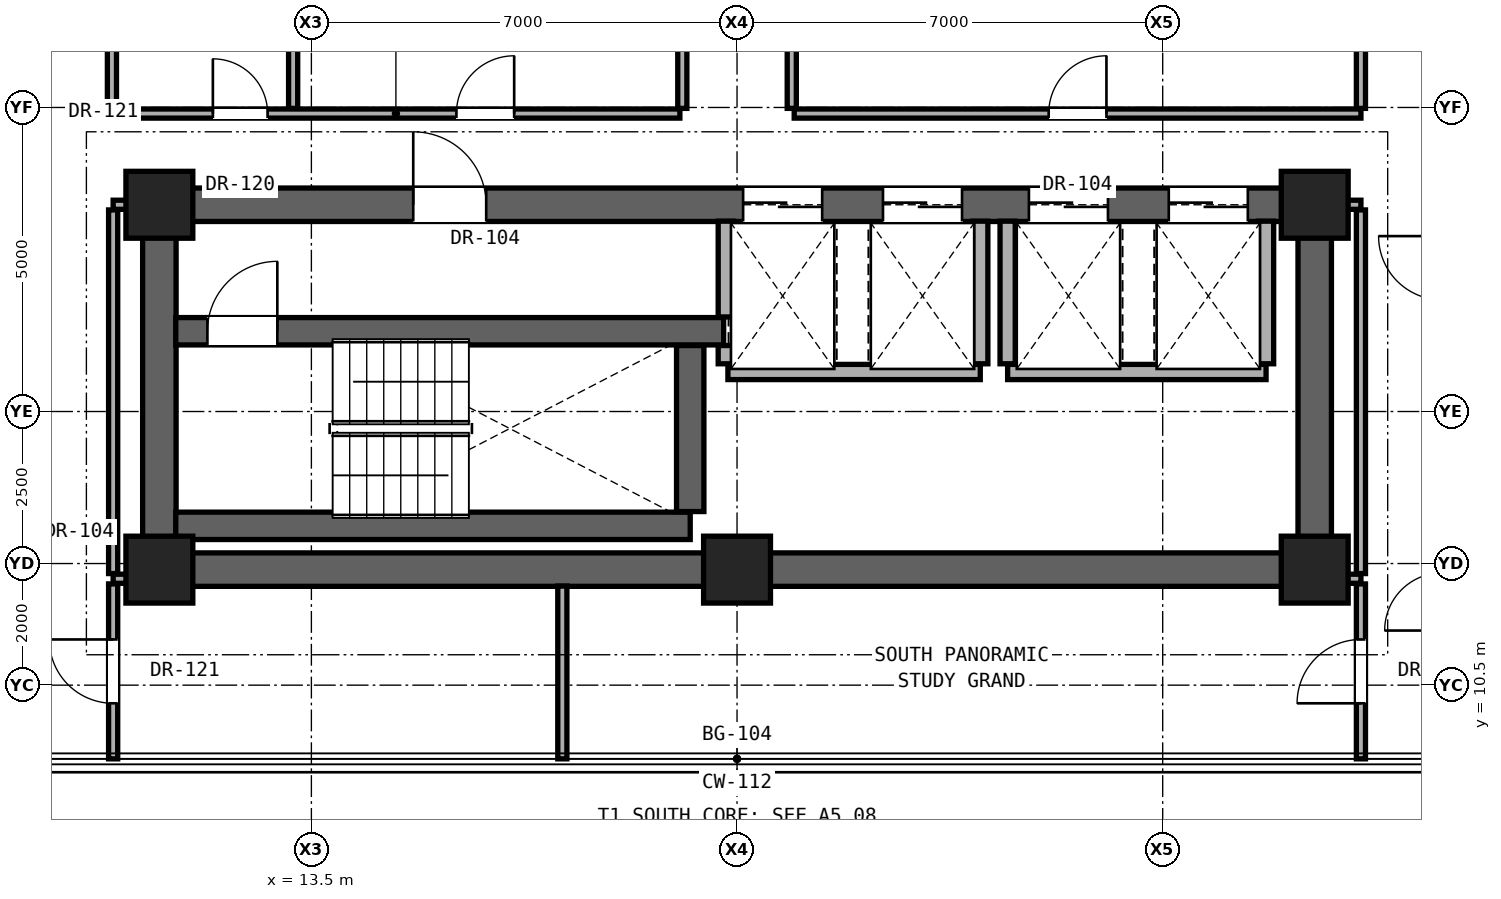
"""IFC4 building model, lengths in metres.
Left out: names, types, materials, properties, quantities, classifications, styles, units other than length and angle.
Written with IfcOpenShell. Run it as: python <this file> out.ifc"""

import sys

from ifc_helpers import new_model, si_unit, direction, frame, frame_2d, origin, origin_2d, place, context, subcontext, project, spatial, rectangle, extrude, element, fill, save


model = new_model("IFC4")
c1 = context("Model", 3, precision=1e-05, world=origin(), true_north=direction((0.0, 1.0)))
c2 = subcontext(c1, "Body", "Model", "MODEL_VIEW")
j1 = project(units=[si_unit("LENGTHUNIT", "METRE"), si_unit("PLANEANGLEUNIT", "RADIAN")], contexts=[c1])
p1 = place(None, origin())
s1 = spatial("IfcSite", under=j1, at=p1, CompositionType="ELEMENT")
p2 = place(p1, origin())
s2 = spatial("IfcBuilding", under=s1, at=p2, CompositionType="ELEMENT")
p3 = place(p2, frame((0.0, 0.0, 131.3)))
s3 = spatial("IfcBuildingStorey", under=s2, at=p3, CompositionType="ELEMENT", Elevation=131.3)
for number, where, z_axis, x_axis in (
    (1, (11.0, 12.4, 0.0), (0.0, 0.0, 1.0), (1.0, 0.0, 0.0)),
    (2, (20.5, 12.4, 0.0), (0.0, 0.0, 1.0), (1.0, 0.0, 0.0)),
    (3, (30.0, 12.4, 0.0), (0.0, 0.0, 1.0), (1.0, 0.0, 0.0)),
    (4, (11.0, 18.4, 0.0), (0.0, 0.0, 1.0), (1.0, 0.0, 0.0)),
    (5, (30.0, 18.4, 0.0), (0.0, 0.0, 1.0), (1.0, 0.0, 0.0)),
):
    element("IfcColumn", number, at=place(p3, frame(where, z_axis=z_axis, x_axis=x_axis)), inside=s3, PredefinedType="COLUMN", context=c2, shape_type="SweptSolid", body=[
        extrude(rectangle(XDim=1.1, YDim=1.1, at=origin_2d()), origin(), (0.0, 0.0, 1.0), 3.3),
    ])
p4 = place(p3, frame((11.0, 12.4, 0.0), z_axis=(0.0, 0.0, 1.0), x_axis=(1.0, 0.0, 0.0)))
e6 = element("IfcWall", 6, at=p4, inside=s3, PredefinedType="SHEAR", context=c2, shape_type="SweptSolid", body=[
    extrude(rectangle(XDim=19.0, YDim=0.55, at=frame_2d((9.5, 0.0))), origin(), (0.0, 0.0, 1.0), 3.08),
])
for number, where, z_axis, x_axis in (
    (7, (11.0, 12.4, 0.0), (0.0, 0.0, 1.0), (0.0, 1.0, 0.0)),
    (8, (30.0, 12.4, 0.0), (0.0, 0.0, 1.0), (0.0, 1.0, 0.0)),
):
    element("IfcWall", number, at=place(p3, frame(where, z_axis=z_axis, x_axis=x_axis)), inside=s3, PredefinedType="SHEAR", context=c2, shape_type="SweptSolid", body=[
        extrude(rectangle(XDim=6.0, YDim=0.55, at=frame_2d((3.0, 0.0))), origin(), (0.0, 0.0, 1.0), 3.08),
    ])
p5 = place(p3, frame((11.0, 18.4, 0.0), z_axis=(0.0, 0.0, 1.0), x_axis=(1.0, 0.0, 0.0)))
e9 = element("IfcWall", 9, at=p5, inside=s3, PredefinedType="SHEAR", context=c2, shape_type="SweptSolid", body=[
    extrude(rectangle(XDim=19.0, YDim=0.55, at=frame_2d((9.5, 0.0))), origin(), (0.0, 0.0, 1.0), 3.08),
])
p6 = place(p5, frame((4.175, 0.0, 0.0)))
e10 = element("IfcOpeningElement", 10, at=p6, cuts=e9, PredefinedType="OPENING", context=c2, shape_type="SweptSolid", body=[
    extrude(rectangle(XDim=1.2, YDim=2.25, at=frame_2d((0.6, 1.125))), frame((0.0, 0.285, 0.0), z_axis=(0.0, -1.0, 0.0), x_axis=(1.0, 0.0, 0.0)), (0.0, 0.0, 1.0), 0.57),
])
p7 = place(p5, frame((9.6, 0.0, 0.0)))
e11 = element("IfcOpeningElement", 11, at=p7, cuts=e9, PredefinedType="OPENING", context=c2, shape_type="SweptSolid", body=[
    extrude(rectangle(XDim=1.3, YDim=2.3, at=frame_2d((0.65, 1.15))), frame((0.0, 0.285, 0.0), z_axis=(0.0, -1.0, 0.0), x_axis=(1.0, 0.0, 0.0)), (0.0, 0.0, 1.0), 0.57),
])
p8 = place(p5, frame((11.9, 0.0, 0.0)))
e12 = element("IfcOpeningElement", 12, at=p8, cuts=e9, PredefinedType="OPENING", context=c2, shape_type="SweptSolid", body=[
    extrude(rectangle(XDim=1.3, YDim=2.3, at=frame_2d((0.65, 1.15))), frame((0.0, 0.285, 0.0), z_axis=(0.0, -1.0, 0.0), x_axis=(1.0, 0.0, 0.0)), (0.0, 0.0, 1.0), 0.57),
])
p9 = place(p5, frame((14.3, 0.0, 0.0)))
e13 = element("IfcOpeningElement", 13, at=p9, cuts=e9, PredefinedType="OPENING", context=c2, shape_type="SweptSolid", body=[
    extrude(rectangle(XDim=1.3, YDim=2.3, at=frame_2d((0.65, 1.15))), frame((0.0, 0.285, 0.0), z_axis=(0.0, -1.0, 0.0), x_axis=(1.0, 0.0, 0.0)), (0.0, 0.0, 1.0), 0.57),
])
p10 = place(p5, frame((16.6, 0.0, 0.0)))
e14 = element("IfcOpeningElement", 14, at=p10, cuts=e9, PredefinedType="OPENING", context=c2, shape_type="SweptSolid", body=[
    extrude(rectangle(XDim=1.3, YDim=2.3, at=frame_2d((0.65, 1.15))), frame((0.0, 0.285, 0.0), z_axis=(0.0, -1.0, 0.0), x_axis=(1.0, 0.0, 0.0)), (0.0, 0.0, 1.0), 0.57),
])
for number, where, z_axis, x_axis in (
    (15, (10.24, 12.25, 0.0), (0.0, 0.0, 1.0), (1.0, 0.0, 0.0)),
    (16, (30.27, 12.25, 0.0), (0.0, 0.0, 1.0), (1.0, 0.0, 0.0)),
):
    element("IfcWall", number, at=place(p3, frame(where, z_axis=z_axis, x_axis=x_axis)), inside=s3, PredefinedType="PARTITIONING", context=c2, shape_type="SweptSolid", body=[
        extrude(rectangle(XDim=0.49, YDim=0.15, at=frame_2d((0.245, 0.0))), origin(), (0.0, 0.0, 1.0), 3.08),
    ])
p11 = place(p3, frame((11.27, 13.12, 0.0), z_axis=(0.0, 0.0, 1.0), x_axis=(1.0, 0.0, 0.0)))
e17 = element("IfcWall", 17, at=p11, inside=s3, PredefinedType="SHEAR", context=c2, shape_type="SweptSolid", body=[
    extrude(rectangle(XDim=8.46, YDim=0.45, at=frame_2d((4.23, 0.0))), origin(), (0.0, 0.0, 1.0), 3.08),
])
p12 = place(p3, frame((20.35, 15.65, 0.0), z_axis=(0.0, 0.0, 1.0), x_axis=(1.0, 0.0, 0.0)))
e18 = element("IfcWall", 18, at=p12, inside=s3, PredefinedType="SOLIDWALL", context=c2, shape_type="SweptSolid", body=[
    extrude(rectangle(XDim=4.15, YDim=0.25, at=frame_2d((2.075, 0.0))), origin(), (0.0, 0.0, 1.0), 3.08),
])
p13 = place(p3, frame((24.95, 15.65, 0.0), z_axis=(0.0, 0.0, 1.0), x_axis=(1.0, 0.0, 0.0)))
e19 = element("IfcWall", 19, at=p13, inside=s3, PredefinedType="SOLIDWALL", context=c2, shape_type="SweptSolid", body=[
    extrude(rectangle(XDim=4.25, YDim=0.25, at=frame_2d((2.125, 0.0))), origin(), (0.0, 0.0, 1.0), 3.08),
])
p14 = place(p3, frame((11.27, 16.32, 0.0), z_axis=(0.0, 0.0, 1.0), x_axis=(1.0, 0.0, 0.0)))
e20 = element("IfcWall", 20, at=p14, inside=s3, PredefinedType="SHEAR", context=c2, shape_type="SweptSolid", body=[
    extrude(rectangle(XDim=9.01, YDim=0.45, at=frame_2d((4.505, 0.0))), origin(), (0.0, 0.0, 1.0), 3.08),
])
p15 = place(p14, frame((0.52, 0.0, 0.0)))
e21 = element("IfcOpeningElement", 21, at=p15, cuts=e20, PredefinedType="OPENING", context=c2, shape_type="SweptSolid", body=[
    extrude(rectangle(XDim=1.15, YDim=2.2, at=frame_2d((0.575, 1.1))), frame((0.0, 0.235, 0.0), z_axis=(0.0, -1.0, 0.0), x_axis=(1.0, 0.0, 0.0)), (0.0, 0.0, 1.0), 0.47),
])
for number, where, z_axis, x_axis in (
    (22, (10.24, 18.4, 0.0), (0.0, 0.0, 1.0), (1.0, 0.0, 0.0)),
    (23, (30.27, 18.4, 0.0), (0.0, 0.0, 1.0), (1.0, 0.0, 0.0)),
):
    element("IfcWall", number, at=place(p3, frame(where, z_axis=z_axis, x_axis=x_axis)), inside=s3, PredefinedType="PARTITIONING", context=c2, shape_type="SweptSolid", body=[
        extrude(rectangle(XDim=0.49, YDim=0.15, at=frame_2d((0.245, 0.0))), origin(), (0.0, 0.0, 1.0), 2.456),
    ])
p16 = place(p3, frame((10.22, 19.9, 0.0), z_axis=(0.0, 0.0, 1.0), x_axis=(1.0, 0.0, 0.0)))
e24 = element("IfcWall", 24, at=p16, inside=s3, PredefinedType="PARTITIONING", context=c2, shape_type="SweptSolid", body=[
    extrude(rectangle(XDim=9.34, YDim=0.15, at=frame_2d((4.67, 0.0))), origin(), (0.0, 0.0, 1.0), 2.216),
])
p17 = place(p16, frame((1.66, 0.0, 0.0)))
e25 = element("IfcOpeningElement", 25, at=p17, cuts=e24, PredefinedType="OPENING", context=c2, shape_type="SweptSolid", body=[
    extrude(rectangle(XDim=0.9, YDim=2.1, at=frame_2d((0.45, 1.05))), frame((0.0, 0.085, 0.0), z_axis=(0.0, -1.0, 0.0), x_axis=(1.0, 0.0, 0.0)), (0.0, 0.0, 1.0), 0.17),
])
p18 = place(p16, frame((5.665, 0.0, 0.0)))
e26 = element("IfcOpeningElement", 26, at=p18, cuts=e24, PredefinedType="OPENING", context=c2, shape_type="SweptSolid", body=[
    extrude(rectangle(XDim=0.95, YDim=2.15, at=frame_2d((0.475, 1.075))), frame((0.0, 0.085, 0.0), z_axis=(0.0, -1.0, 0.0), x_axis=(1.0, 0.0, 0.0)), (0.0, 0.0, 1.0), 0.17),
])
p19 = place(p3, frame((21.44, 19.9, 0.0), z_axis=(0.0, 0.0, 1.0), x_axis=(1.0, 0.0, 0.0)))
e27 = element("IfcWall", 27, at=p19, inside=s3, PredefinedType="PARTITIONING", context=c2, shape_type="SweptSolid", body=[
    extrude(rectangle(XDim=9.32, YDim=0.15, at=frame_2d((4.66, 0.0))), origin(), (0.0, 0.0, 1.0), 2.216),
])
p20 = place(p19, frame((4.185, 0.0, 0.0)))
e28 = element("IfcOpeningElement", 28, at=p20, cuts=e27, PredefinedType="OPENING", context=c2, shape_type="SweptSolid", body=[
    extrude(rectangle(XDim=0.95, YDim=2.15, at=frame_2d((0.475, 1.075))), frame((0.0, 0.085, 0.0), z_axis=(0.0, -1.0, 0.0), x_axis=(1.0, 0.0, 0.0)), (0.0, 0.0, 1.0), 0.17),
])
p21 = place(p3, frame((10.22, 19.985, 0.0), z_axis=(0.0, 0.0, 1.0), x_axis=(0.0, 1.0, 0.0)))
e29 = element("IfcWall", 29, at=p21, inside=s3, PredefinedType="PARTITIONING", context=c2, shape_type="SweptSolid", body=[
    extrude(rectangle(XDim=2.78, YDim=0.15, at=frame_2d((1.39, 0.0))), origin(), (0.0, 0.0, 1.0), 3.08),
])
p22 = place(p3, frame((10.24, 9.288, 0.0), z_axis=(0.0, 0.0, 1.0), x_axis=(0.0, 1.0, 0.0)))
e30 = element("IfcWall", 30, at=p22, inside=s3, PredefinedType="PARTITIONING", context=c2, shape_type="SweptSolid", body=[
    extrude(rectangle(XDim=2.877, YDim=0.15, at=frame_2d((1.438, 0.0))), origin(), (0.0, 0.0, 1.0), 3.08),
])
p23 = place(p22, frame((0.914, 0.0, 0.0)))
e31 = element("IfcOpeningElement", 31, at=p23, cuts=e30, PredefinedType="OPENING", context=c2, shape_type="SweptSolid", body=[
    extrude(rectangle(XDim=1.05, YDim=2.2, at=frame_2d((0.525, 1.1))), frame((0.0, 0.085, 0.0), z_axis=(0.0, -1.0, 0.0), x_axis=(1.0, 0.0, 0.0)), (0.0, 0.0, 1.0), 0.17),
])
p24 = place(p3, frame((10.24, 12.335, 0.0), z_axis=(0.0, 0.0, 1.0), x_axis=(0.0, 1.0, 0.0)))
e32 = element("IfcWall", 32, at=p24, inside=s3, PredefinedType="PARTITIONING", context=c2, shape_type="SweptSolid", body=[
    extrude(rectangle(XDim=5.98, YDim=0.15, at=frame_2d((2.99, 0.0))), origin(), (0.0, 0.0, 1.0), 2.456),
])
p25 = place(p3, frame((13.2, 19.985, 0.0), z_axis=(0.0, 0.0, 1.0), x_axis=(0.0, 1.0, 0.0)))
e33 = element("IfcWall", 33, at=p25, inside=s3, PredefinedType="PARTITIONING", context=c2, shape_type="SweptSolid", body=[
    extrude(rectangle(XDim=2.78, YDim=0.15, at=frame_2d((1.39, 0.0))), origin(), (0.0, 0.0, 1.0), 3.08),
])
p26 = place(p3, frame((17.627, 9.288, 0.0), z_axis=(0.0, 0.0, 1.0), x_axis=(0.0, 1.0, 0.0)))
e34 = element("IfcWall", 34, at=p26, inside=s3, PredefinedType="PARTITIONING", context=c2, shape_type="SweptSolid", body=[
    extrude(rectangle(XDim=2.842, YDim=0.15, at=frame_2d((1.421, 0.0))), origin(), (0.0, 0.0, 1.0), 3.08),
])
p27 = place(p3, frame((19.6, 19.985, 0.0), z_axis=(0.0, 0.0, 1.0), x_axis=(0.0, 1.0, 0.0)))
e35 = element("IfcWall", 35, at=p27, inside=s3, PredefinedType="PARTITIONING", context=c2, shape_type="SweptSolid", body=[
    extrude(rectangle(XDim=5.53, YDim=0.15, at=frame_2d((2.765, 0.0))), origin(), (0.0, 0.0, 1.0), 2.216),
])
p28 = place(p3, frame((19.73, 13.355, 0.0), z_axis=(0.0, 0.0, 1.0), x_axis=(0.0, 1.0, 0.0)))
e36 = element("IfcWall", 36, at=p28, inside=s3, PredefinedType="SHEAR", context=c2, shape_type="SweptSolid", body=[
    extrude(rectangle(XDim=2.73, YDim=0.45, at=frame_2d((1.365, 0.0))), origin(), (0.0, 0.0, 1.0), 3.08),
])
p29 = place(p3, frame((20.315, 15.785, 0.0), z_axis=(0.0, 0.0, 1.0), x_axis=(0.0, 1.0, 0.0)))
e37 = element("IfcWall", 37, at=p29, inside=s3, PredefinedType="SOLIDWALL", context=c2, shape_type="SweptSolid", body=[
    extrude(rectangle(XDim=0.3, YDim=0.25, at=frame_2d((0.15, 0.0))), origin(), (0.0, 0.0, 1.0), 3.08),
])
p30 = place(p3, frame((20.315, 16.555, 0.0), z_axis=(0.0, 0.0, 1.0), x_axis=(0.0, 1.0, 0.0)))
e38 = element("IfcWall", 38, at=p30, inside=s3, PredefinedType="SOLIDWALL", context=c2, shape_type="SweptSolid", body=[
    extrude(rectangle(XDim=1.575, YDim=0.25, at=frame_2d((0.788, 0.0))), origin(), (0.0, 0.0, 1.0), 3.08),
])
p31 = place(p3, frame((21.4, 19.985, 0.0), z_axis=(0.0, 0.0, 1.0), x_axis=(0.0, 1.0, 0.0)))
e39 = element("IfcWall", 39, at=p31, inside=s3, PredefinedType="PARTITIONING", context=c2, shape_type="SweptSolid", body=[
    extrude(rectangle(XDim=5.53, YDim=0.15, at=frame_2d((2.765, 0.0))), origin(), (0.0, 0.0, 1.0), 2.216),
])
for number, where, z_axis, x_axis in (
    (40, (24.5, 15.785, 0.0), (0.0, 0.0, 1.0), (0.0, 1.0, 0.0)),
    (41, (24.95, 15.785, 0.0), (0.0, 0.0, 1.0), (0.0, 1.0, 0.0)),
    (42, (29.2, 15.785, 0.0), (0.0, 0.0, 1.0), (0.0, 1.0, 0.0)),
):
    element("IfcWall", number, at=place(p3, frame(where, z_axis=z_axis, x_axis=x_axis)), inside=s3, PredefinedType="SOLIDWALL", context=c2, shape_type="SweptSolid", body=[
        extrude(rectangle(XDim=2.345, YDim=0.25, at=frame_2d((1.172, 0.0))), origin(), (0.0, 0.0, 1.0), 3.08),
    ])
p32 = place(p3, frame((30.76, 9.288, 0.0), z_axis=(0.0, 0.0, 1.0), x_axis=(0.0, 1.0, 0.0)))
e43 = element("IfcWall", 43, at=p32, inside=s3, PredefinedType="PARTITIONING", context=c2, shape_type="SweptSolid", body=[
    extrude(rectangle(XDim=2.877, YDim=0.15, at=frame_2d((1.438, 0.0))), origin(), (0.0, 0.0, 1.0), 3.08),
])
p33 = place(p32, frame((0.914, 0.0, 0.0)))
e44 = element("IfcOpeningElement", 44, at=p33, cuts=e43, PredefinedType="OPENING", context=c2, shape_type="SweptSolid", body=[
    extrude(rectangle(XDim=1.05, YDim=2.2, at=frame_2d((0.525, 1.1))), frame((0.0, 0.085, 0.0), z_axis=(0.0, -1.0, 0.0), x_axis=(1.0, 0.0, 0.0)), (0.0, 0.0, 1.0), 0.17),
])
p34 = place(p3, frame((30.76, 12.335, 0.0), z_axis=(0.0, 0.0, 1.0), x_axis=(0.0, 1.0, 0.0)))
e45 = element("IfcWall", 45, at=p34, inside=s3, PredefinedType="PARTITIONING", context=c2, shape_type="SweptSolid", body=[
    extrude(rectangle(XDim=5.98, YDim=0.15, at=frame_2d((2.99, 0.0))), origin(), (0.0, 0.0, 1.0), 2.456),
])
p35 = place(p3, frame((30.76, 19.985, 0.0), z_axis=(0.0, 0.0, 1.0), x_axis=(0.0, 1.0, 0.0)))
e46 = element("IfcWall", 46, at=p35, inside=s3, PredefinedType="PARTITIONING", context=c2, shape_type="SweptSolid", body=[
    extrude(rectangle(XDim=5.53, YDim=0.15, at=frame_2d((2.765, 0.0))), origin(), (0.0, 0.0, 1.0), 2.299),
])
p36 = place(p6, origin())
e47 = element("IfcDoor", 47, at=p36, inside=s3, OperationType="SINGLE_SWING_LEFT", PredefinedType="DOOR", context=c2, shape_type="SweptSolid", body=[
    extrude(rectangle(XDim=1.2, YDim=2.25, at=frame_2d((0.6, 1.125))), frame((0.0, 0.025, 0.0), z_axis=(0.0, -1.0, 0.0), x_axis=(1.0, 0.0, 0.0)), (0.0, 0.0, 1.0), 0.05),
])
fill(e10, e47)
p37 = place(p15, origin())
e48 = element("IfcDoor", 48, at=p37, inside=s3, OperationType="SINGLE_SWING_RIGHT", PredefinedType="DOOR", context=c2, shape_type="SweptSolid", body=[
    extrude(rectangle(XDim=1.15, YDim=2.2, at=frame_2d((0.575, 1.1))), frame((0.0, 0.025, 0.0), z_axis=(0.0, -1.0, 0.0), x_axis=(1.0, 0.0, 0.0)), (0.0, 0.0, 1.0), 0.05),
])
fill(e21, e48)
p38 = place(p17, origin())
e49 = element("IfcDoor", 49, at=p38, inside=s3, OperationType="SINGLE_SWING_LEFT", PredefinedType="DOOR", context=c2, shape_type="SweptSolid", body=[
    extrude(rectangle(XDim=0.9, YDim=2.1, at=frame_2d((0.45, 1.05))), frame((0.0, 0.025, 0.0), z_axis=(0.0, -1.0, 0.0), x_axis=(1.0, 0.0, 0.0)), (0.0, 0.0, 1.0), 0.05),
])
fill(e25, e49)
p39 = place(p18, origin())
e50 = element("IfcDoor", 50, at=p39, inside=s3, OperationType="SINGLE_SWING_RIGHT", PredefinedType="DOOR", context=c2, shape_type="SweptSolid", body=[
    extrude(rectangle(XDim=0.95, YDim=2.15, at=frame_2d((0.475, 1.075))), frame((0.0, 0.025, 0.0), z_axis=(0.0, -1.0, 0.0), x_axis=(1.0, 0.0, 0.0)), (0.0, 0.0, 1.0), 0.05),
])
fill(e26, e50)
p40 = place(p20, origin())
e51 = element("IfcDoor", 51, at=p40, inside=s3, OperationType="SINGLE_SWING_RIGHT", PredefinedType="DOOR", context=c2, shape_type="SweptSolid", body=[
    extrude(rectangle(XDim=0.95, YDim=2.15, at=frame_2d((0.475, 1.075))), frame((0.0, 0.025, 0.0), z_axis=(0.0, -1.0, 0.0), x_axis=(1.0, 0.0, 0.0)), (0.0, 0.0, 1.0), 0.05),
])
fill(e28, e51)
p41 = place(p23, origin())
e52 = element("IfcDoor", 52, at=p41, inside=s3, OperationType="SINGLE_SWING_RIGHT", PredefinedType="DOOR", context=c2, shape_type="SweptSolid", body=[
    extrude(rectangle(XDim=1.05, YDim=2.2, at=frame_2d((0.525, 1.1))), frame((0.0, 0.025, 0.0), z_axis=(0.0, -1.0, 0.0), x_axis=(1.0, 0.0, 0.0)), (0.0, 0.0, 1.0), 0.05),
])
fill(e31, e52)
p42 = place(p33, origin())
e53 = element("IfcDoor", 53, at=p42, inside=s3, OperationType="SINGLE_SWING_LEFT", PredefinedType="DOOR", context=c2, shape_type="SweptSolid", body=[
    extrude(rectangle(XDim=1.05, YDim=2.2, at=frame_2d((0.525, 1.1))), frame((0.0, 0.025, 0.0), z_axis=(0.0, -1.0, 0.0), x_axis=(1.0, 0.0, 0.0)), (0.0, 0.0, 1.0), 0.05),
])
fill(e44, e53)
p43 = place(p7, origin())
e54 = element("IfcDoor", 54, at=p43, inside=s3, OperationType="DOUBLE_DOOR_SLIDING", PredefinedType="DOOR", context=c2, shape_type="SweptSolid", body=[
    extrude(rectangle(XDim=1.3, YDim=2.3, at=frame_2d((0.65, 1.15))), frame((0.0, 0.025, 0.0), z_axis=(0.0, -1.0, 0.0), x_axis=(1.0, 0.0, 0.0)), (0.0, 0.0, 1.0), 0.05),
])
fill(e11, e54)
p44 = place(p8, origin())
e55 = element("IfcDoor", 55, at=p44, inside=s3, OperationType="DOUBLE_DOOR_SLIDING", PredefinedType="DOOR", context=c2, shape_type="SweptSolid", body=[
    extrude(rectangle(XDim=1.3, YDim=2.3, at=frame_2d((0.65, 1.15))), frame((0.0, 0.025, 0.0), z_axis=(0.0, -1.0, 0.0), x_axis=(1.0, 0.0, 0.0)), (0.0, 0.0, 1.0), 0.05),
])
fill(e12, e55)
p45 = place(p9, origin())
e56 = element("IfcDoor", 56, at=p45, inside=s3, OperationType="DOUBLE_DOOR_SLIDING", PredefinedType="DOOR", context=c2, shape_type="SweptSolid", body=[
    extrude(rectangle(XDim=1.3, YDim=2.3, at=frame_2d((0.65, 1.15))), frame((0.0, 0.025, 0.0), z_axis=(0.0, -1.0, 0.0), x_axis=(1.0, 0.0, 0.0)), (0.0, 0.0, 1.0), 0.05),
])
fill(e13, e56)
p46 = place(p10, origin())
e57 = element("IfcDoor", 57, at=p46, inside=s3, OperationType="DOUBLE_DOOR_SLIDING", PredefinedType="DOOR", context=c2, shape_type="SweptSolid", body=[
    extrude(rectangle(XDim=1.3, YDim=2.3, at=frame_2d((0.65, 1.15))), frame((0.0, 0.025, 0.0), z_axis=(0.0, -1.0, 0.0), x_axis=(1.0, 0.0, 0.0)), (0.0, 0.0, 1.0), 0.05),
])
fill(e14, e57)
save(model, sys.argv[1])
